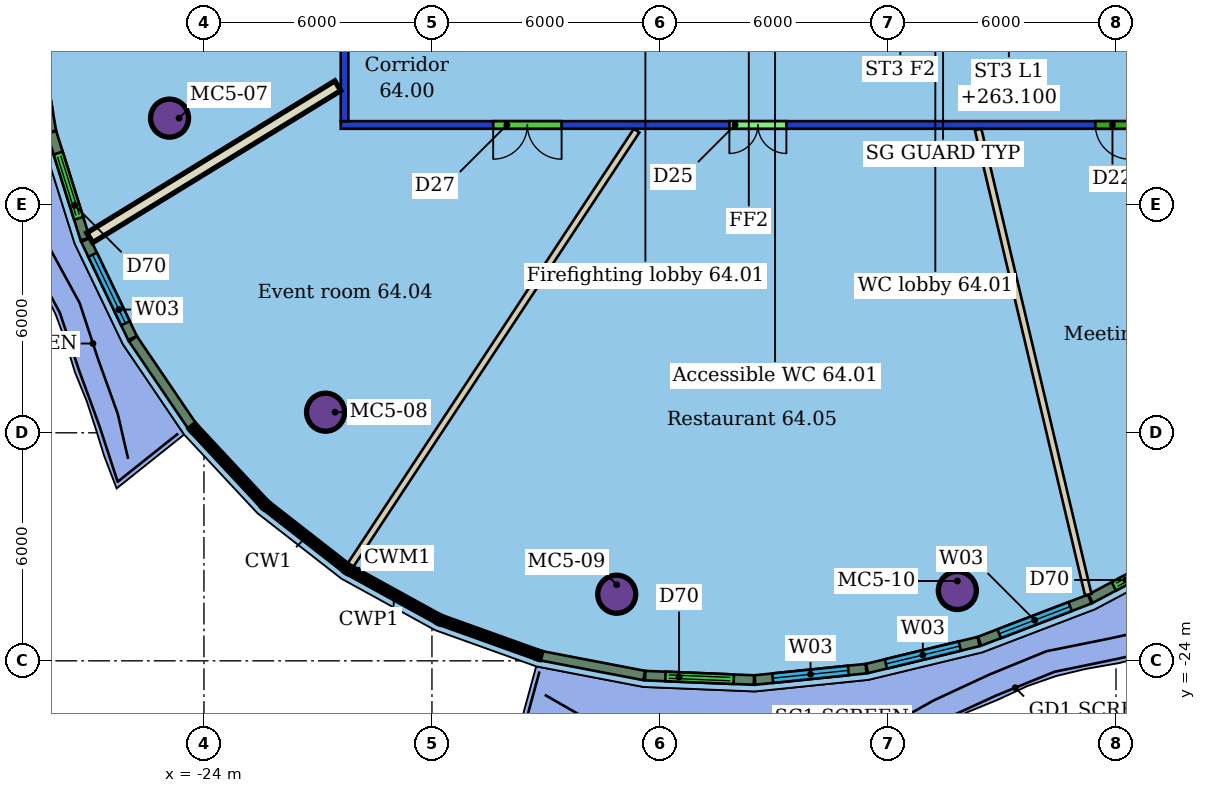
"""IFC4 building model, lengths in metres.
Left out: names, types, materials, properties, quantities, classifications, styles, units other than length and angle.
Written with IfcOpenShell. Run it as: python <this file> out.ifc"""

import sys

from ifc_helpers import new_model, si_unit, direction, frame, frame_2d, origin, origin_2d, place, context, subcontext, project, spatial, rectangle, hollow_circle, extrude, element, fill, save


model = new_model("IFC4")
c1 = context("Model", 3, precision=1e-05, world=origin(), true_north=direction((0.0, 1.0)))
c2 = subcontext(c1, "Body", "Model", "MODEL_VIEW")
j1 = project(units=[si_unit("LENGTHUNIT", "METRE"), si_unit("PLANEANGLEUNIT", "RADIAN")], contexts=[c1])
p1 = place(None, origin())
s1 = spatial("IfcSite", under=j1, at=p1, CompositionType="ELEMENT")
p2 = place(p1, origin())
s2 = spatial("IfcBuilding", under=s1, at=p2, CompositionType="ELEMENT")
p3 = place(p2, frame((0.0, 0.0, 261.3)))
s3 = spatial("IfcBuildingStorey", under=s2, at=p3, CompositionType="ELEMENT", Elevation=261.3)
for number, where, z_axis, x_axis in (
    (1, (-24.906, -9.72, 0.0), (0.0, 0.0, 1.0), (1.0, 0.0, 0.0)),
    (2, (-20.8, -17.457, 0.0), (0.0, 0.0, 1.0), (1.0, 0.0, 0.0)),
    (3, (-13.138, -22.247, 0.0), (0.0, 0.0, 1.0), (1.0, 0.0, 0.0)),
    (4, (-4.175, -22.149, 0.0), (0.0, 0.0, 1.0), (1.0, 0.0, 0.0)),
):
    element("IfcColumn", number, at=place(p3, frame(where, z_axis=z_axis, x_axis=x_axis)), inside=s3, PredefinedType="COLUMN", context=c2, shape_type="SweptSolid", body=[
        extrude(hollow_circle(Radius=0.5, WallThickness=0.04, at=origin_2d()), origin(), (0.0, 0.0, 1.0), 3.45),
    ])
p4 = place(p3, frame((8.4, -9.9, 0.0), z_axis=(0.0, 0.0, 1.0), x_axis=(-1.0, 0.0, 0.0)))
e5 = element("IfcWall", 5, at=p4, inside=s3, PredefinedType="PARTITIONING", context=c2, shape_type="SweptSolid", body=[
    extrude(rectangle(XDim=28.8, YDim=0.2, at=frame_2d((14.4, 0.0))), origin(), (0.0, 0.0, 1.0), 3.1),
])
p5 = place(p4, frame((22.989, 0.0, 0.0)))
e6 = element("IfcOpeningElement", 6, at=p5, cuts=e5, PredefinedType="OPENING", context=c2, shape_type="SweptSolid", body=[
    extrude(rectangle(XDim=1.8, YDim=2.4, at=frame_2d((0.9, 1.2))), frame((0.0, 0.11, 0.0), z_axis=(0.0, -1.0, 0.0), x_axis=(1.0, 0.0, 0.0)), (0.0, 0.0, 1.0), 0.22),
])
p6 = place(p4, frame((17.073, 0.0, 0.0)))
e7 = element("IfcOpeningElement", 7, at=p6, cuts=e5, PredefinedType="OPENING", context=c2, shape_type="SweptSolid", body=[
    extrude(rectangle(XDim=1.5, YDim=2.4, at=frame_2d((0.75, 1.2))), frame((0.0, 0.11, 0.0), z_axis=(0.0, -1.0, 0.0), x_axis=(1.0, 0.0, 0.0)), (0.0, 0.0, 1.0), 0.22),
])
p7 = place(p4, frame((8.043, 0.0, 0.0)))
e8 = element("IfcOpeningElement", 8, at=p7, cuts=e5, PredefinedType="OPENING", context=c2, shape_type="SweptSolid", body=[
    extrude(rectangle(XDim=0.9, YDim=2.1, at=frame_2d((0.45, 1.05))), frame((0.0, 0.11, 0.0), z_axis=(0.0, -1.0, 0.0), x_axis=(1.0, 0.0, 0.0)), (0.0, 0.0, 1.0), 0.22),
])
p8 = place(p4, frame((3.308, 0.0, 0.0)))
e9 = element("IfcOpeningElement", 9, at=p8, cuts=e5, PredefinedType="OPENING", context=c2, shape_type="SweptSolid", body=[
    extrude(rectangle(XDim=1.5, YDim=2.1, at=frame_2d((0.75, 1.05))), frame((0.0, 0.11, 0.0), z_axis=(0.0, -1.0, 0.0), x_axis=(1.0, 0.0, 0.0)), (0.0, 0.0, 1.0), 0.22),
])
p9 = place(p3, frame((-20.3, -9.8, 0.0), z_axis=(0.0, 0.0, 1.0), x_axis=(0.0, 1.0, 0.0)))
e10 = element("IfcWall", 10, at=p9, inside=s3, PredefinedType="PARTITIONING", context=c2, shape_type="SweptSolid", body=[
    extrude(rectangle(XDim=19.6, YDim=0.2, at=frame_2d((9.8, 0.0))), origin(), (0.0, 0.0, 1.0), 3.1),
])
p10 = place(p9, frame((13.678, 0.0, 0.0)))
e11 = element("IfcOpeningElement", 11, at=p10, cuts=e10, PredefinedType="OPENING", context=c2, shape_type="SweptSolid", body=[
    extrude(rectangle(XDim=1.5, YDim=2.1, at=frame_2d((0.75, 1.05))), frame((0.0, 0.11, 0.0), z_axis=(0.0, -1.0, 0.0), x_axis=(1.0, 0.0, 0.0)), (0.0, 0.0, 1.0), 0.22),
])
p11 = place(p9, frame((6.822, 0.0, 0.0)))
e12 = element("IfcOpeningElement", 12, at=p11, cuts=e10, PredefinedType="OPENING", context=c2, shape_type="SweptSolid", body=[
    extrude(rectangle(XDim=1.8, YDim=2.4, at=frame_2d((0.9, 1.2))), frame((0.0, 0.11, 0.0), z_axis=(0.0, -1.0, 0.0), x_axis=(1.0, 0.0, 0.0)), (0.0, 0.0, 1.0), 0.22),
])
p12 = place(p3, frame((-27.006, -12.867, 0.0), z_axis=(0.0, 0.0, 1.0), x_axis=(0.852737367146, 0.522339911047, 0.0)))
e13 = element("IfcWall", 13, at=p12, inside=s3, PredefinedType="PARTITIONING", context=c2, shape_type="SweptSolid", body=[
    extrude(rectangle(XDim=7.655, YDim=0.3, at=frame_2d((3.827, 0.0))), origin(), (0.0, 0.0, 1.0), 3.45),
])
p13 = place(p3, frame((-20.146, -21.485, 0.0), z_axis=(0.0, 0.0, 1.0), x_axis=(0.549897752102, 0.835231981089, 0.0)))
e14 = element("IfcWall", 14, at=p13, inside=s3, PredefinedType="PARTITIONING", context=c2, shape_type="SweptSolid", body=[
    extrude(rectangle(XDim=13.694, YDim=0.175, at=frame_2d((6.847, 0.0))), origin(), (0.0, 0.0, 1.0), 3.45),
])
p14 = place(p3, frame((-0.731, -22.257, 0.0), z_axis=(0.0, 0.0, 1.0), x_axis=(-0.23038317053, 0.973099992157, 0.0)))
e15 = element("IfcWall", 15, at=p14, inside=s3, PredefinedType="PARTITIONING", context=c2, shape_type="SweptSolid", body=[
    extrude(rectangle(XDim=12.574, YDim=0.175, at=frame_2d((6.287, 0.0))), origin(), (0.0, 0.0, 1.0), 3.45),
])
p15 = place(p3, frame((-28.522, -7.092, 0.0), z_axis=(0.0, 0.0, 1.0), x_axis=(0.168497464049, -0.985702087149, 0.0)))
e16 = element("IfcWall", 16, at=p15, inside=s3, PredefinedType="SOLIDWALL", context=c2, shape_type="SweptSolid", body=[
    extrude(rectangle(XDim=3.022, YDim=0.25, at=frame_2d((1.511, 0.0))), origin(), (0.0, 0.0, 1.0), 3.15),
])
p16 = place(p15, frame((0.511, 0.0, 0.9)))
e17 = element("IfcOpeningElement", 17, at=p16, cuts=e16, PredefinedType="OPENING", context=c2, shape_type="SweptSolid", body=[
    extrude(rectangle(XDim=2.0, YDim=2.1, at=frame_2d((1.0, 1.05))), frame((0.0, 0.135, 0.0), z_axis=(0.0, -1.0, 0.0), x_axis=(1.0, 0.0, 0.0)), (0.0, 0.0, 1.0), 0.27),
])
p17 = place(p3, frame((-28.007, -10.096, 0.0), z_axis=(0.0, 0.0, 1.0), x_axis=(0.299763978955, -0.954013394519, 0.0)))
e18 = element("IfcWall", 18, at=p17, inside=s3, PredefinedType="SOLIDWALL", context=c2, shape_type="SweptSolid", body=[
    extrude(rectangle(XDim=2.94, YDim=0.25, at=frame_2d((1.47, 0.0))), origin(), (0.0, 0.0, 1.0), 3.15),
])
p18 = place(p17, frame((0.57, 0.0, 0.0)))
e19 = element("IfcOpeningElement", 19, at=p18, cuts=e18, PredefinedType="OPENING", context=c2, shape_type="SweptSolid", body=[
    extrude(rectangle(XDim=1.8, YDim=2.4, at=frame_2d((0.9, 1.2))), frame((0.0, 0.135, 0.0), z_axis=(0.0, -1.0, 0.0), x_axis=(1.0, 0.0, 0.0)), (0.0, 0.0, 1.0), 0.27),
])
p19 = place(p3, frame((-27.116, -12.925, 0.0), z_axis=(0.0, 0.0, 1.0), x_axis=(0.432043625995, -0.901852707063, 0.0)))
e20 = element("IfcWall", 20, at=p19, inside=s3, PredefinedType="SOLIDWALL", context=c2, shape_type="SweptSolid", body=[
    extrude(rectangle(XDim=2.864, YDim=0.25, at=frame_2d((1.432, 0.0))), origin(), (0.0, 0.0, 1.0), 3.15),
])
p20 = place(p19, frame((0.432, 0.0, 0.9)))
e21 = element("IfcOpeningElement", 21, at=p20, cuts=e20, PredefinedType="OPENING", context=c2, shape_type="SweptSolid", body=[
    extrude(rectangle(XDim=2.0, YDim=2.1, at=frame_2d((1.0, 1.05))), frame((0.0, 0.135, 0.0), z_axis=(0.0, -1.0, 0.0), x_axis=(1.0, 0.0, 0.0)), (0.0, 0.0, 1.0), 0.27),
])
p21 = place(p3, frame((-25.866, -15.531, 0.0), z_axis=(0.0, 0.0, 1.0), x_axis=(0.561217901017, -0.827668090226, 0.0)))
e22 = element("IfcWall", 22, at=p21, inside=s3, PredefinedType="SOLIDWALL", context=c2, shape_type="SweptSolid", body=[
    extrude(rectangle(XDim=2.759, YDim=0.25, at=frame_2d((1.379, 0.0))), origin(), (0.0, 0.0, 1.0), 3.15),
])
p22 = place(p3, frame((-15.124, -23.866, 0.0), z_axis=(0.0, 0.0, 1.0), x_axis=(0.982095327887, -0.188384625018, 0.0)))
e23 = element("IfcWall", 23, at=p22, inside=s3, PredefinedType="SOLIDWALL", context=c2, shape_type="SweptSolid", body=[
    extrude(rectangle(XDim=2.759, YDim=0.25, at=frame_2d((1.379, 0.0))), origin(), (0.0, 0.0, 1.0), 3.15),
])
p23 = place(p3, frame((-12.388, -24.389, 0.0), z_axis=(0.0, 0.0, 1.0), x_axis=(0.999183295278, -0.040407207744, 0.0)))
e24 = element("IfcWall", 24, at=p23, inside=s3, PredefinedType="SOLIDWALL", context=c2, shape_type="SweptSolid", body=[
    extrude(rectangle(XDim=2.864, YDim=0.25, at=frame_2d((1.432, 0.0))), origin(), (0.0, 0.0, 1.0), 3.15),
])
p24 = place(p23, frame((0.532, 0.0, 0.0)))
e25 = element("IfcOpeningElement", 25, at=p24, cuts=e24, PredefinedType="OPENING", context=c2, shape_type="SweptSolid", body=[
    extrude(rectangle(XDim=1.8, YDim=2.4, at=frame_2d((0.9, 1.2))), frame((0.0, 0.135, 0.0), z_axis=(0.0, -1.0, 0.0), x_axis=(1.0, 0.0, 0.0)), (0.0, 0.0, 1.0), 0.27),
])
p25 = place(p3, frame((-9.501, -24.504, 0.0), z_axis=(0.0, 0.0, 1.0), x_axis=(0.99482112725, 0.101641156908, 0.0)))
e26 = element("IfcWall", 26, at=p25, inside=s3, PredefinedType="SOLIDWALL", context=c2, shape_type="SweptSolid", body=[
    extrude(rectangle(XDim=2.94, YDim=0.25, at=frame_2d((1.47, 0.0))), origin(), (0.0, 0.0, 1.0), 3.15),
])
p26 = place(p25, frame((0.47, 0.0, 0.9)))
e27 = element("IfcOpeningElement", 27, at=p26, cuts=e26, PredefinedType="OPENING", context=c2, shape_type="SweptSolid", body=[
    extrude(rectangle(XDim=2.0, YDim=2.1, at=frame_2d((1.0, 1.05))), frame((0.0, 0.135, 0.0), z_axis=(0.0, -1.0, 0.0), x_axis=(1.0, 0.0, 0.0)), (0.0, 0.0, 1.0), 0.27),
])
p27 = place(p3, frame((-6.552, -24.201, 0.0), z_axis=(0.0, 0.0, 1.0), x_axis=(0.972022459513, 0.234887926896, 0.0)))
e28 = element("IfcWall", 28, at=p27, inside=s3, PredefinedType="SOLIDWALL", context=c2, shape_type="SweptSolid", body=[
    extrude(rectangle(XDim=3.022, YDim=0.25, at=frame_2d((1.511, 0.0))), origin(), (0.0, 0.0, 1.0), 3.15),
])
p28 = place(p27, frame((0.511, 0.0, 0.9)))
e29 = element("IfcOpeningElement", 29, at=p28, cuts=e28, PredefinedType="OPENING", context=c2, shape_type="SweptSolid", body=[
    extrude(rectangle(XDim=2.0, YDim=2.1, at=frame_2d((1.0, 1.05))), frame((0.0, 0.135, 0.0), z_axis=(0.0, -1.0, 0.0), x_axis=(1.0, 0.0, 0.0)), (0.0, 0.0, 1.0), 0.27),
])
p29 = place(p3, frame((-3.591, -23.484, 0.0), z_axis=(0.0, 0.0, 1.0), x_axis=(0.93395615703, 0.357387600156, 0.0)))
e30 = element("IfcWall", 30, at=p29, inside=s3, PredefinedType="SOLIDWALL", context=c2, shape_type="SweptSolid", body=[
    extrude(rectangle(XDim=3.105, YDim=0.25, at=frame_2d((1.553, 0.0))), origin(), (0.0, 0.0, 1.0), 3.15),
])
p30 = place(p29, frame((0.553, 0.0, 0.9)))
e31 = element("IfcOpeningElement", 31, at=p30, cuts=e30, PredefinedType="OPENING", context=c2, shape_type="SweptSolid", body=[
    extrude(rectangle(XDim=2.0, YDim=2.1, at=frame_2d((1.0, 1.05))), frame((0.0, 0.135, 0.0), z_axis=(0.0, -1.0, 0.0), x_axis=(1.0, 0.0, 0.0)), (0.0, 0.0, 1.0), 0.27),
])
p31 = place(p3, frame((-0.669, -22.365, 0.0), z_axis=(0.0, 0.0, 1.0), x_axis=(0.883433244898, 0.468557042216, 0.0)))
e32 = element("IfcWall", 32, at=p31, inside=s3, PredefinedType="SOLIDWALL", context=c2, shape_type="SweptSolid", body=[
    extrude(rectangle(XDim=3.184, YDim=0.25, at=frame_2d((1.592, 0.0))), origin(), (0.0, 0.0, 1.0), 3.15),
])
p32 = place(p31, frame((0.692, 0.0, 0.0)))
e33 = element("IfcOpeningElement", 33, at=p32, cuts=e32, PredefinedType="OPENING", context=c2, shape_type="SweptSolid", body=[
    extrude(rectangle(XDim=1.8, YDim=2.4, at=frame_2d((0.9, 1.2))), frame((0.0, 0.135, 0.0), z_axis=(0.0, -1.0, 0.0), x_axis=(1.0, 0.0, 0.0)), (0.0, 0.0, 1.0), 0.27),
])
p33 = place(p5, origin())
e34 = element("IfcDoor", 34, at=p33, inside=s3, OperationType="DOUBLE_DOOR_SINGLE_SWING", PredefinedType="DOOR", context=c2, shape_type="SweptSolid", body=[
    extrude(rectangle(XDim=1.8, YDim=2.4, at=frame_2d((0.9, 1.2))), frame((0.0, 0.025, 0.0), z_axis=(0.0, -1.0, 0.0), x_axis=(1.0, 0.0, 0.0)), (0.0, 0.0, 1.0), 0.05),
])
fill(e6, e34)
p34 = place(p6, origin())
e35 = element("IfcDoor", 35, at=p34, inside=s3, OperationType="DOUBLE_DOOR_SINGLE_SWING", PredefinedType="DOOR", context=c2, shape_type="SweptSolid", body=[
    extrude(rectangle(XDim=1.5, YDim=2.4, at=frame_2d((0.75, 1.2))), frame((0.0, 0.025, 0.0), z_axis=(0.0, -1.0, 0.0), x_axis=(1.0, 0.0, 0.0)), (0.0, 0.0, 1.0), 0.05),
])
fill(e7, e35)
p35 = place(p7, origin())
e36 = element("IfcDoor", 36, at=p35, inside=s3, OperationType="SINGLE_SWING_LEFT", PredefinedType="DOOR", context=c2, shape_type="SweptSolid", body=[
    extrude(rectangle(XDim=0.9, YDim=2.1, at=frame_2d((0.45, 1.05))), frame((0.0, 0.025, 0.0), z_axis=(0.0, -1.0, 0.0), x_axis=(1.0, 0.0, 0.0)), (0.0, 0.0, 1.0), 0.05),
])
fill(e8, e36)
p36 = place(p18, origin())
e37 = element("IfcDoor", 37, at=p36, inside=s3, OperationType="DOUBLE_DOOR_SLIDING", PredefinedType="DOOR", context=c2, shape_type="SweptSolid", body=[
    extrude(rectangle(XDim=1.8, YDim=2.4, at=frame_2d((0.9, 1.2))), frame((0.0, 0.025, 0.0), z_axis=(0.0, -1.0, 0.0), x_axis=(1.0, 0.0, 0.0)), (0.0, 0.0, 1.0), 0.05),
])
fill(e19, e37)
p37 = place(p20, origin())
e38 = element("IfcWindow", 38, at=p37, inside=s3, PartitioningType="SINGLE_PANEL", PredefinedType="WINDOW", context=c2, shape_type="SweptSolid", body=[
    extrude(rectangle(XDim=2.0, YDim=2.1, at=frame_2d((1.0, 1.05))), frame((0.0, 0.03, 0.0), z_axis=(0.0, -1.0, 0.0), x_axis=(1.0, 0.0, 0.0)), (0.0, 0.0, 1.0), 0.06),
])
fill(e21, e38)
p38 = place(p24, origin())
e39 = element("IfcDoor", 39, at=p38, inside=s3, OperationType="DOUBLE_DOOR_SLIDING", PredefinedType="DOOR", context=c2, shape_type="SweptSolid", body=[
    extrude(rectangle(XDim=1.8, YDim=2.4, at=frame_2d((0.9, 1.2))), frame((0.0, 0.025, 0.0), z_axis=(0.0, -1.0, 0.0), x_axis=(1.0, 0.0, 0.0)), (0.0, 0.0, 1.0), 0.05),
])
fill(e25, e39)
p39 = place(p26, origin())
e40 = element("IfcWindow", 40, at=p39, inside=s3, PartitioningType="SINGLE_PANEL", PredefinedType="WINDOW", context=c2, shape_type="SweptSolid", body=[
    extrude(rectangle(XDim=2.0, YDim=2.1, at=frame_2d((1.0, 1.05))), frame((0.0, 0.03, 0.0), z_axis=(0.0, -1.0, 0.0), x_axis=(1.0, 0.0, 0.0)), (0.0, 0.0, 1.0), 0.06),
])
fill(e27, e40)
p40 = place(p28, origin())
e41 = element("IfcWindow", 41, at=p40, inside=s3, PartitioningType="SINGLE_PANEL", PredefinedType="WINDOW", context=c2, shape_type="SweptSolid", body=[
    extrude(rectangle(XDim=2.0, YDim=2.1, at=frame_2d((1.0, 1.05))), frame((0.0, 0.03, 0.0), z_axis=(0.0, -1.0, 0.0), x_axis=(1.0, 0.0, 0.0)), (0.0, 0.0, 1.0), 0.06),
])
fill(e29, e41)
p41 = place(p30, origin())
e42 = element("IfcWindow", 42, at=p41, inside=s3, PartitioningType="SINGLE_PANEL", PredefinedType="WINDOW", context=c2, shape_type="SweptSolid", body=[
    extrude(rectangle(XDim=2.0, YDim=2.1, at=frame_2d((1.0, 1.05))), frame((0.0, 0.03, 0.0), z_axis=(0.0, -1.0, 0.0), x_axis=(1.0, 0.0, 0.0)), (0.0, 0.0, 1.0), 0.06),
])
fill(e31, e42)
p42 = place(p32, origin())
e43 = element("IfcDoor", 43, at=p42, inside=s3, OperationType="DOUBLE_DOOR_SLIDING", PredefinedType="DOOR", context=c2, shape_type="SweptSolid", body=[
    extrude(rectangle(XDim=1.8, YDim=2.4, at=frame_2d((0.9, 1.2))), frame((0.0, 0.025, 0.0), z_axis=(0.0, -1.0, 0.0), x_axis=(1.0, 0.0, 0.0)), (0.0, 0.0, 1.0), 0.05),
])
fill(e33, e43)
save(model, sys.argv[1])
